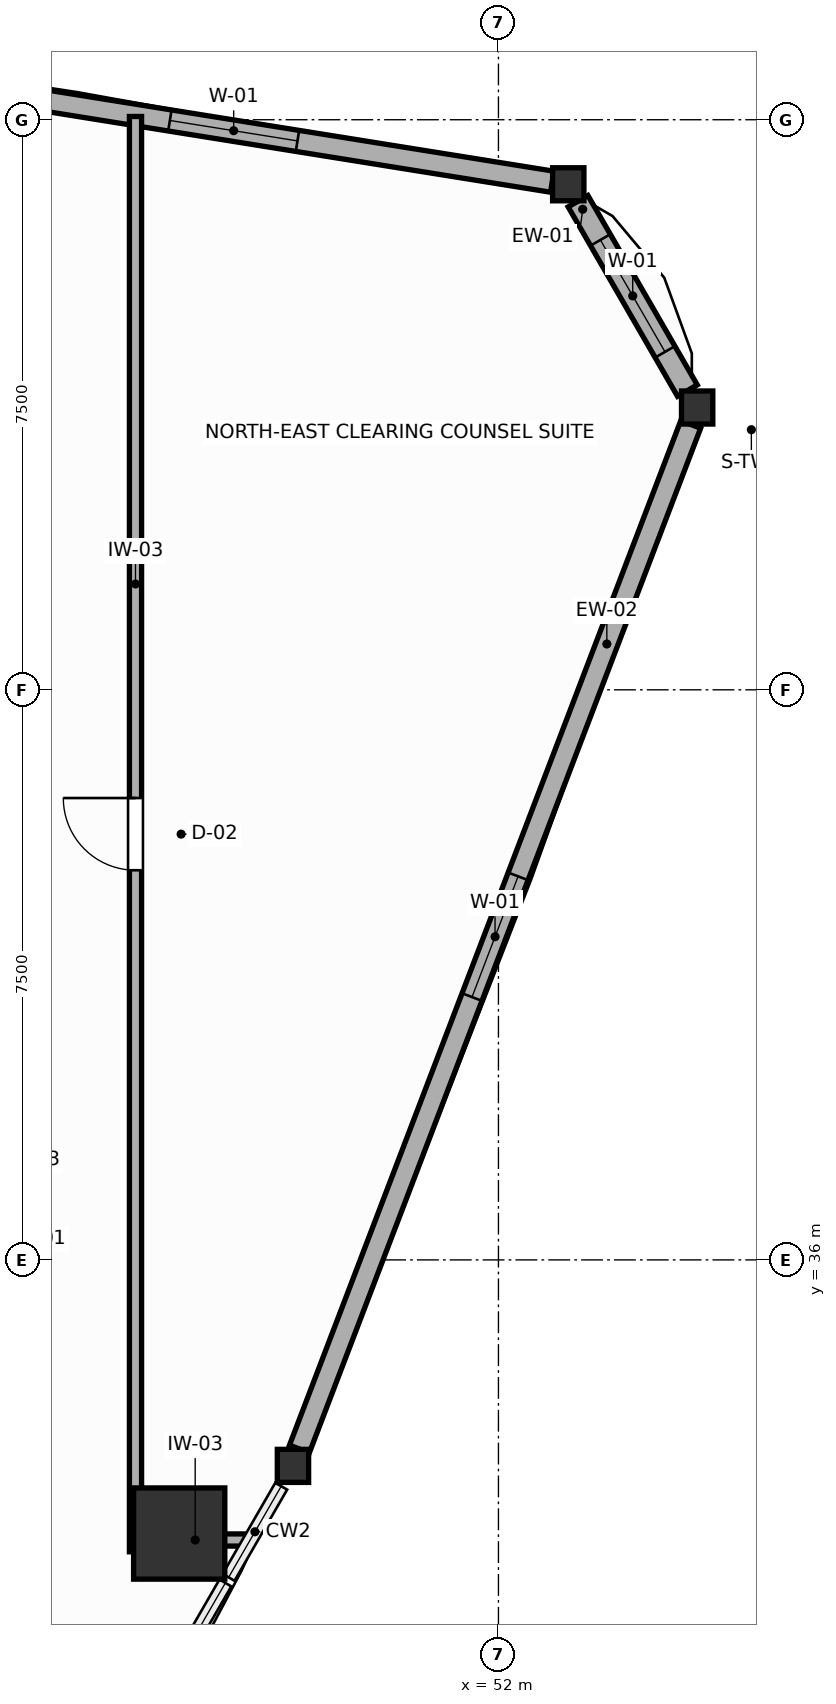
"""IFC4 building model, lengths in metres.
Left out: names, types, materials, properties, quantities, classifications, styles, units other than length and angle.
Written with IfcOpenShell. Run it as: python <this file> out.ifc"""

import sys

from ifc_helpers import new_model, si_unit, direction, frame, frame_2d, origin, origin_2d, place, context, subcontext, project, spatial, rectangle, i_section, extrude, source, transform, mapped, element, fill, save


model = new_model("IFC4")
c1 = context("Model", 3, precision=1e-05, world=origin(), true_north=direction((0.0, 1.0)))
c2 = subcontext(c1, "Body", "Model", "MODEL_VIEW")
j1 = project(units=[si_unit("LENGTHUNIT", "METRE"), si_unit("PLANEANGLEUNIT", "RADIAN")], contexts=[c1])
p1 = place(None, origin())
s1 = spatial("IfcSite", under=j1, at=p1, CompositionType="ELEMENT")
p2 = place(p1, origin())
s2 = spatial("IfcBuilding", under=s1, at=p2, CompositionType="ELEMENT")
p3 = place(p2, frame((0.0, 0.0, 157.8)))
s3 = spatial("IfcBuildingStorey", under=s2, at=p3, CompositionType="ELEMENT", Elevation=157.8)
m1 = source(origin(), c2, "Body", "SweptSolid", [
    extrude(rectangle(XDim=1.2, YDim=1.2, at=origin_2d()), origin(), (0.0, 0.0, 1.0), 3.6),
])
p4 = place(p3, frame((47.8, 32.4, 0.0), z_axis=(0.0, 0.0, 1.0), x_axis=(1.0, 0.0, 0.0)))
e1 = element("IfcColumn", 1, at=p4, inside=s3, PredefinedType="COLUMN", context=c2, shape_type="MappedRepresentation", body=[
    mapped(m1, transform((0.0, 0.0, 0.0), scale=1.0)),
])
m2 = source(origin(), c2, "Body", "SweptSolid", [
    extrude(i_section(OverallWidth=0.412, OverallDepth=0.435, WebThickness=0.033, FlangeThickness=0.053, FilletRadius=0.015, at=origin_2d()), origin(), (0.0, 0.0, 1.0), 3.6),
])
for number, where, z_axis, x_axis in (
    (2, (54.614, 47.214, 0.0), (0.0, 0.0, 1.0), (1.0, 0.0, 0.0)),
    (3, (52.919, 50.151, 0.0), (0.0, 0.0, 1.0), (1.0, 0.0, 0.0)),
    (4, (49.297, 33.29, 0.0), (0.0, 0.0, 1.0), (1.0, 0.0, 0.0)),
):
    element("IfcColumn", number, at=place(p3, frame(where, z_axis=z_axis, x_axis=x_axis)), inside=s3, PredefinedType="COLUMN", context=c2, shape_type="MappedRepresentation", body=[
        mapped(m2, transform((0.0, 0.0, 0.0), scale=1.0)),
    ])
p5 = place(p3, frame((54.486, 47.436, 0.0), z_axis=(0.0, 0.0, 1.0), x_axis=(-0.499962359318, 0.866047134552, 0.0)))
e5 = element("IfcWall", 5, at=p5, inside=s3, PredefinedType="SOLIDWALL", context=c2, shape_type="SweptSolid", body=[
    extrude(rectangle(XDim=2.878, YDim=0.3, at=frame_2d((1.439, 0.0))), origin(), (0.0, 0.0, 1.0), 3.0),
])
p6 = place(p5, frame((0.589, 0.0, 0.75)))
e6 = element("IfcOpeningElement", 6, at=p6, cuts=e5, PredefinedType="OPENING", context=c2, shape_type="SweptSolid", body=[
    extrude(rectangle(XDim=1.7, YDim=1.75, at=frame_2d((0.85, 0.875))), frame((0.0, 0.16, 0.0), z_axis=(0.0, -1.0, 0.0), x_axis=(1.0, 0.0, 0.0)), (0.0, 0.0, 1.0), 0.32),
])
p7 = place(p3, frame((52.708, 50.185, 0.0), z_axis=(0.0, 0.0, 1.0), x_axis=(-0.98742305143, 0.158100339991, 0.0)))
e7 = element("IfcWall", 7, at=p7, inside=s3, PredefinedType="SOLIDWALL", context=c2, shape_type="SweptSolid", body=[
    extrude(rectangle(XDim=14.477, YDim=0.28, at=frame_2d((7.239, 0.0))), origin(), (0.0, 0.0, 1.0), 3.0),
])
p8 = place(p7, frame((3.394, 0.0, 0.75)))
e8 = element("IfcOpeningElement", 8, at=p8, cuts=e7, PredefinedType="OPENING", context=c2, shape_type="SweptSolid", body=[
    extrude(rectangle(XDim=1.7, YDim=1.75, at=frame_2d((0.85, 0.875))), frame((0.0, 0.15, 0.0), z_axis=(0.0, -1.0, 0.0), x_axis=(1.0, 0.0, 0.0)), (0.0, 0.0, 1.0), 0.3),
])
p9 = place(p3, frame((49.382, 33.513, 0.0), z_axis=(0.0, 0.0, 1.0), x_axis=(0.356778358033, 0.934189061828, 0.0)))
e9 = element("IfcWall", 9, at=p9, inside=s3, PredefinedType="SOLIDWALL", context=c2, shape_type="SweptSolid", body=[
    extrude(rectangle(XDim=14.428, YDim=0.28, at=frame_2d((7.214, 0.0))), origin(), (0.0, 0.0, 1.0), 3.0),
])
p10 = place(p9, frame((6.364, 0.0, 0.75)))
e10 = element("IfcOpeningElement", 10, at=p10, cuts=e9, PredefinedType="OPENING", context=c2, shape_type="SweptSolid", body=[
    extrude(rectangle(XDim=1.7, YDim=1.75, at=frame_2d((0.85, 0.875))), frame((0.0, 0.15, 0.0), z_axis=(0.0, -1.0, 0.0), x_axis=(1.0, 0.0, 0.0)), (0.0, 0.0, 1.0), 0.3),
])
p11 = place(p3, frame((47.225, 32.16, 0.0), z_axis=(0.0, 0.0, 1.0), x_axis=(0.0, 1.0, 0.0)))
e11 = element("IfcWall", 11, at=p11, inside=s3, PredefinedType="PARTITIONING", context=c2, shape_type="SweptSolid", body=[
    extrude(rectangle(XDim=18.883, YDim=0.16, at=frame_2d((9.441, 0.0))), origin(), (0.0, 0.0, 1.0), 3.4),
])
p12 = place(p11, frame((8.966, 0.0, 0.0)))
e12 = element("IfcOpeningElement", 12, at=p12, cuts=e11, PredefinedType="OPENING", context=c2, shape_type="SweptSolid", body=[
    extrude(rectangle(XDim=0.95, YDim=2.05, at=frame_2d((0.475, 1.025))), frame((0.0, 0.09, 0.0), z_axis=(0.0, -1.0, 0.0), x_axis=(1.0, 0.0, 0.0)), (0.0, 0.0, 1.0), 0.18),
])
p13 = place(p3, frame((47.307, 32.315, 0.0), z_axis=(0.0, 0.0, 1.0), x_axis=(1.0, 0.0, 0.0)))
e13 = element("IfcWall", 13, at=p13, inside=s3, PredefinedType="PARTITIONING", context=c2, shape_type="SweptSolid", body=[
    extrude(rectangle(XDim=1.407, YDim=0.16, at=frame_2d((0.703, 0.0))), origin(), (0.0, 0.0, 1.0), 2.95),
])
p14 = place(p6, origin())
e14 = element("IfcWindow", 14, at=p14, inside=s3, PartitioningType="SINGLE_PANEL", PredefinedType="WINDOW", context=c2, shape_type="SweptSolid", body=[
    extrude(rectangle(XDim=1.7, YDim=1.75, at=frame_2d((0.85, 0.875))), frame((0.0, 0.03, 0.0), z_axis=(0.0, -1.0, 0.0), x_axis=(1.0, 0.0, 0.0)), (0.0, 0.0, 1.0), 0.06),
])
fill(e6, e14)
p15 = place(p8, origin())
e15 = element("IfcWindow", 15, at=p15, inside=s3, PartitioningType="SINGLE_PANEL", PredefinedType="WINDOW", context=c2, shape_type="SweptSolid", body=[
    extrude(rectangle(XDim=1.7, YDim=1.75, at=frame_2d((0.85, 0.875))), frame((0.0, 0.03, 0.0), z_axis=(0.0, -1.0, 0.0), x_axis=(1.0, 0.0, 0.0)), (0.0, 0.0, 1.0), 0.06),
])
fill(e8, e15)
p16 = place(p10, origin())
e16 = element("IfcWindow", 16, at=p16, inside=s3, PartitioningType="SINGLE_PANEL", PredefinedType="WINDOW", context=c2, shape_type="SweptSolid", body=[
    extrude(rectangle(XDim=1.7, YDim=1.75, at=frame_2d((0.85, 0.875))), frame((0.0, 0.03, 0.0), z_axis=(0.0, -1.0, 0.0), x_axis=(1.0, 0.0, 0.0)), (0.0, 0.0, 1.0), 0.06),
])
fill(e10, e16)
p17 = place(p12, origin())
e17 = element("IfcDoor", 17, at=p17, inside=s3, OperationType="SINGLE_SWING_RIGHT", PredefinedType="DOOR", context=c2, shape_type="SweptSolid", body=[
    extrude(rectangle(XDim=0.95, YDim=2.05, at=frame_2d((0.475, 1.025))), frame((0.0, 0.025, 0.0), z_axis=(0.0, -1.0, 0.0), x_axis=(1.0, 0.0, 0.0)), (0.0, 0.0, 1.0), 0.05),
])
fill(e12, e17)
save(model, sys.argv[1])
